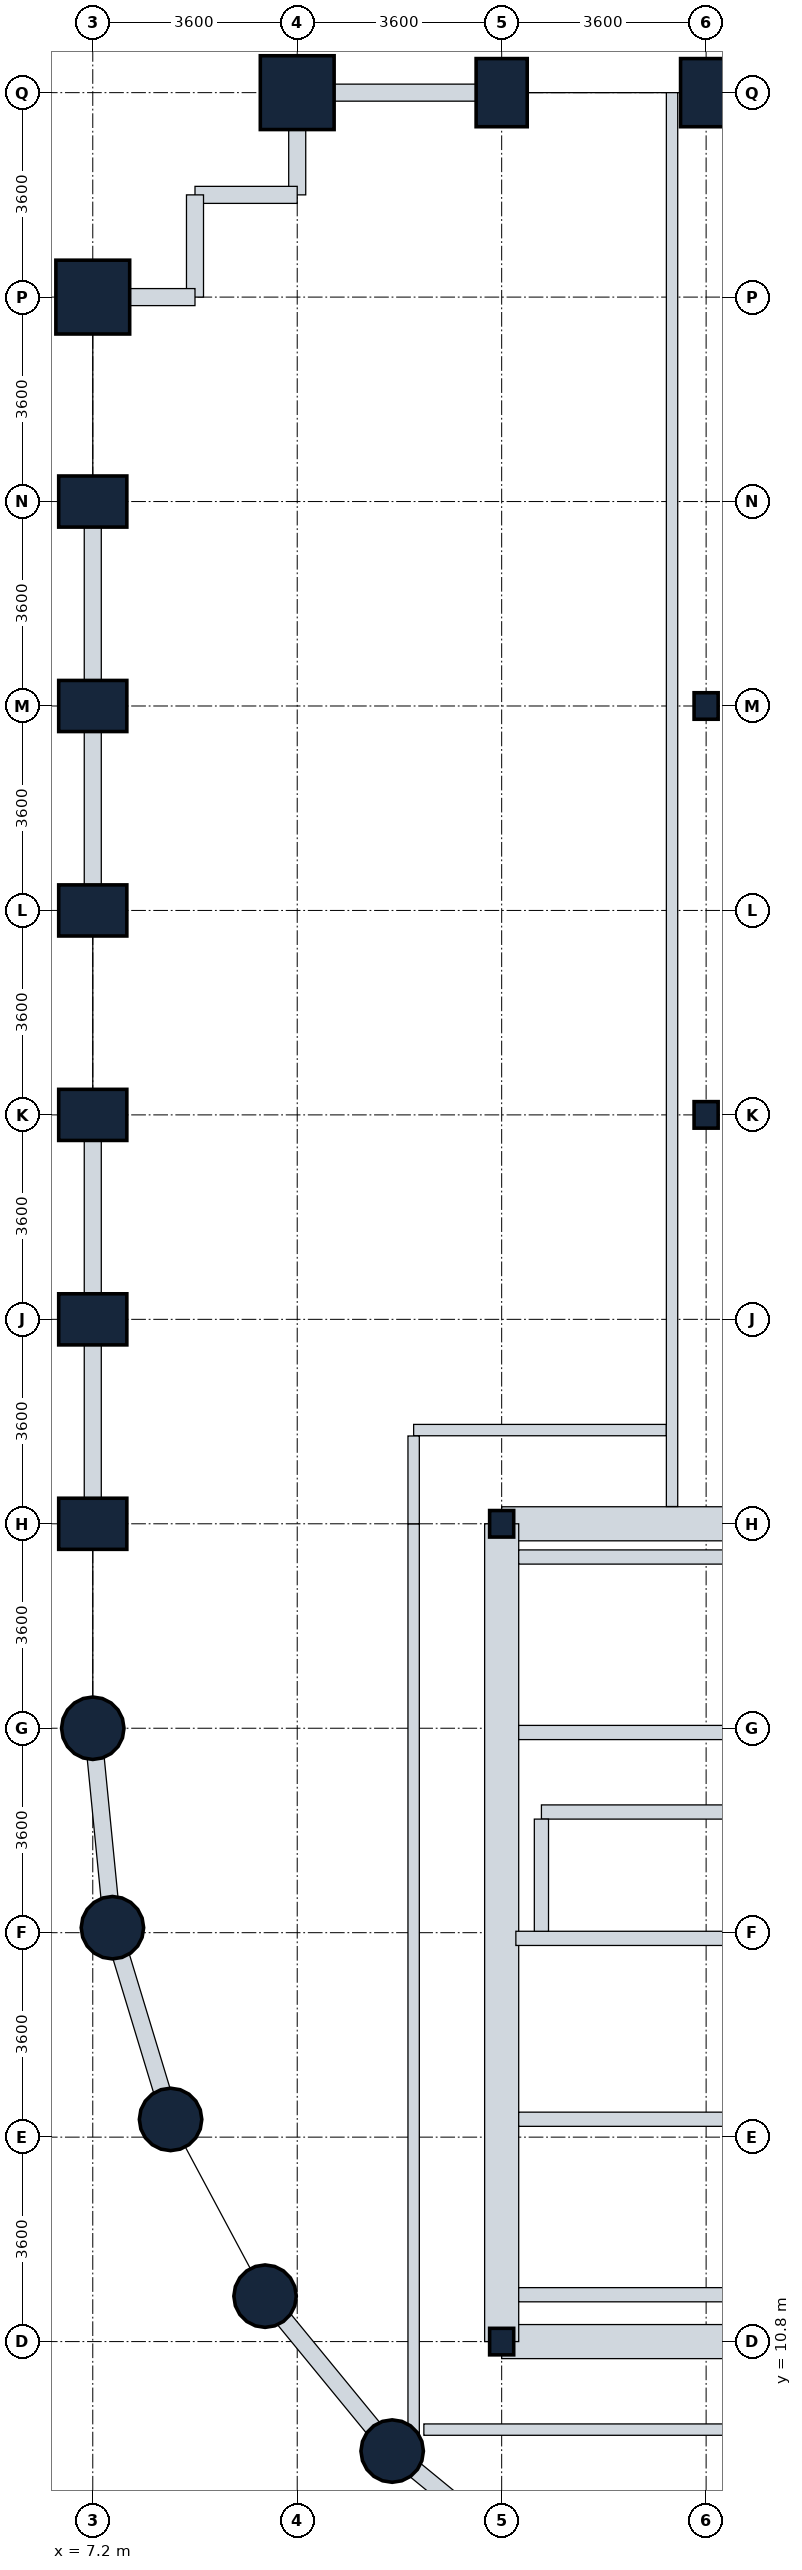
"""IFC4 building model, lengths in metres.
Left out: names, types, materials, properties, quantities, classifications, styles, units other than length and angle.
Written with IfcOpenShell. Run it as: python <this file> out.ifc"""

import sys

from ifc_helpers import new_model, si_unit, direction, frame, frame_2d, origin, origin_2d, place, context, subcontext, project, spatial, rectangle, circle, i_section, extrude, element, fill, save


model = new_model("IFC4")
c1 = context("Model", 3, precision=1e-05, world=origin(), true_north=direction((0.0, 1.0)))
c2 = subcontext(c1, "Body", "Model", "MODEL_VIEW")
j1 = project(units=[si_unit("LENGTHUNIT", "METRE"), si_unit("PLANEANGLEUNIT", "RADIAN")], contexts=[c1])
p1 = place(None, origin())
s1 = spatial("IfcSite", under=j1, at=p1, CompositionType="ELEMENT")
p2 = place(p1, origin())
s2 = spatial("IfcBuilding", under=s1, at=p2, CompositionType="ELEMENT")
p3 = place(p2, frame((0.0, 0.0, 74.7)))
s3 = spatial("IfcBuildingStorey", under=s2, at=p3, CompositionType="ELEMENT", Elevation=74.7)
p4 = place(p3, frame((7.2, 21.6, 0.0), z_axis=(0.0, 0.0, 1.0), x_axis=(1.0, 0.0, 0.0)))
e1 = element("IfcColumn", 1, at=p4, inside=s3, PredefinedType="COLUMN", context=c2, shape_type="SweptSolid", body=[
    extrude(circle(Radius=0.55, at=origin_2d()), origin(), (0.0, 0.0, 1.0), 5.4),
])
for number, where, z_axis, x_axis in (
    (2, (7.2, 25.2, 0.0), (0.0, 0.0, 1.0), (0.0, 1.0, 0.0)),
    (3, (7.2, 28.8, 0.0), (0.0, 0.0, 1.0), (0.0, 1.0, 0.0)),
    (4, (7.2, 32.4, 0.0), (0.0, 0.0, 1.0), (0.0, 1.0, 0.0)),
    (5, (7.2, 36.0, 0.0), (0.0, 0.0, 1.0), (0.0, 1.0, 0.0)),
    (6, (7.2, 39.6, 0.0), (0.0, 0.0, 1.0), (0.0, 1.0, 0.0)),
    (7, (7.2, 43.2, 0.0), (0.0, 0.0, 1.0), (0.0, 1.0, 0.0)),
):
    element("IfcColumn", number, at=place(p3, frame(where, z_axis=z_axis, x_axis=x_axis)), inside=s3, PredefinedType="COLUMN", context=c2, shape_type="SweptSolid", body=[
        extrude(rectangle(XDim=0.9, YDim=1.2, at=origin_2d()), origin(), (0.0, 0.0, 1.0), 5.4),
    ])
p5 = place(p3, frame((7.2, 46.8, 0.0), z_axis=(0.0, 0.0, 1.0), x_axis=(0.0, 1.0, 0.0)))
e8 = element("IfcColumn", 8, at=p5, inside=s3, PredefinedType="COLUMN", context=c2, shape_type="SweptSolid", body=[
    extrude(rectangle(XDim=1.3, YDim=1.3, at=origin_2d()), origin(), (0.0, 0.0, 1.0), 5.4),
])
for number, where, z_axis, x_axis in (
    (9, (7.546, 18.088, 0.0), (0.0, 0.0, 1.0), (1.0, 0.0, 0.0)),
    (10, (8.57, 14.712, 0.0), (0.0, 0.0, 1.0), (1.0, 0.0, 0.0)),
    (11, (10.234, 11.6, 0.0), (0.0, 0.0, 1.0), (1.0, 0.0, 0.0)),
):
    element("IfcColumn", number, at=place(p3, frame(where, z_axis=z_axis, x_axis=x_axis)), inside=s3, PredefinedType="COLUMN", context=c2, shape_type="SweptSolid", body=[
        extrude(circle(Radius=0.55, at=origin_2d()), origin(), (0.0, 0.0, 1.0), 5.4),
    ])
p6 = place(p3, frame((10.8, 50.4, 0.0), z_axis=(0.0, 0.0, 1.0), x_axis=(1.0, 0.0, 0.0)))
e12 = element("IfcColumn", 12, at=p6, inside=s3, PredefinedType="COLUMN", context=c2, shape_type="SweptSolid", body=[
    extrude(rectangle(XDim=1.3, YDim=1.3, at=origin_2d()), origin(), (0.0, 0.0, 1.0), 5.4),
])
p7 = place(p3, frame((12.472, 8.872, 0.0), z_axis=(0.0, 0.0, 1.0), x_axis=(1.0, 0.0, 0.0)))
e13 = element("IfcColumn", 13, at=p7, inside=s3, PredefinedType="COLUMN", context=c2, shape_type="SweptSolid", body=[
    extrude(circle(Radius=0.55, at=origin_2d()), origin(), (0.0, 0.0, 1.0), 5.4),
])
for number, where, z_axis, x_axis in (
    (14, (14.4, 10.8, 0.0), (0.0, 0.0, 1.0), (1.0, 0.0, 0.0)),
    (15, (14.4, 25.2, 0.0), (0.0, 0.0, 1.0), (1.0, 0.0, 0.0)),
):
    element("IfcColumn", number, at=place(p3, frame(where, z_axis=z_axis, x_axis=x_axis)), inside=s3, PredefinedType="COLUMN", context=c2, shape_type="SweptSolid", body=[
        extrude(i_section(OverallWidth=0.424, OverallDepth=0.467, WebThickness=0.033, FlangeThickness=0.053, FilletRadius=0.015, at=origin_2d()), origin(), (0.0, 0.0, 1.0), 5.4),
    ])
p8 = place(p3, frame((14.4, 50.4, 0.0), z_axis=(0.0, 0.0, 1.0), x_axis=(1.0, 0.0, 0.0)))
e16 = element("IfcColumn", 16, at=p8, inside=s3, PredefinedType="COLUMN", context=c2, shape_type="SweptSolid", body=[
    extrude(rectangle(XDim=0.9, YDim=1.2, at=origin_2d()), origin(), (0.0, 0.0, 1.0), 5.4),
])
for number, where, z_axis, x_axis in (
    (17, (18.0, 32.4, 0.0), (0.0, 0.0, 1.0), (1.0, 0.0, 0.0)),
    (18, (18.0, 39.6, 0.0), (0.0, 0.0, 1.0), (1.0, 0.0, 0.0)),
):
    element("IfcColumn", number, at=place(p3, frame(where, z_axis=z_axis, x_axis=x_axis)), inside=s3, PredefinedType="COLUMN", context=c2, shape_type="SweptSolid", body=[
        extrude(i_section(OverallWidth=0.424, OverallDepth=0.467, WebThickness=0.033, FlangeThickness=0.053, FilletRadius=0.015, at=origin_2d()), origin(), (0.0, 0.0, 1.0), 5.4),
    ])
p9 = place(p3, frame((18.0, 50.4, 0.0), z_axis=(0.0, 0.0, 1.0), x_axis=(1.0, 0.0, 0.0)))
e19 = element("IfcColumn", 19, at=p9, inside=s3, PredefinedType="COLUMN", context=c2, shape_type="SweptSolid", body=[
    extrude(rectangle(XDim=0.9, YDim=1.2, at=origin_2d()), origin(), (0.0, 0.0, 1.0), 5.4),
])
p10 = place(p3, frame((18.0, 50.4, 0.0), z_axis=(0.0, 0.0, 1.0), x_axis=(1.0, 0.0, 0.0)))
e20 = element("IfcWall", 20, at=p10, inside=s3, PredefinedType="STANDARD", context=c2, shape_type="SweptSolid", body=[
    extrude(rectangle(XDim=3.6, YDim=0.3, at=frame_2d((1.8, 0.0))), origin(), (0.0, 0.0, 1.0), 3.58),
])
p11 = place(p3, frame((10.8, 50.4, 0.0), z_axis=(0.0, 0.0, 1.0), x_axis=(1.0, 0.0, 0.0)))
e21 = element("IfcWall", 21, at=p11, inside=s3, PredefinedType="STANDARD", context=c2, shape_type="SweptSolid", body=[
    extrude(rectangle(XDim=3.6, YDim=0.3, at=frame_2d((1.8, 0.0))), origin(), (0.0, 0.0, 1.0), 4.03),
])
p12 = place(p3, frame((10.8, 48.6, 0.0), z_axis=(0.0, 0.0, 1.0), x_axis=(0.0, 1.0, 0.0)))
e22 = element("IfcWall", 22, at=p12, inside=s3, PredefinedType="STANDARD", context=c2, shape_type="SweptSolid", body=[
    extrude(rectangle(XDim=1.8, YDim=0.3, at=frame_2d((0.9, 0.0))), origin(), (0.0, 0.0, 1.0), 4.03),
])
p13 = place(p3, frame((9.0, 48.6, 0.0), z_axis=(0.0, 0.0, 1.0), x_axis=(1.0, 0.0, 0.0)))
e23 = element("IfcWall", 23, at=p13, inside=s3, PredefinedType="STANDARD", context=c2, shape_type="SweptSolid", body=[
    extrude(rectangle(XDim=1.8, YDim=0.3, at=frame_2d((0.9, 0.0))), origin(), (0.0, 0.0, 1.0), 5.065),
])
for number, where, z_axis, x_axis in (
    (24, (9.0, 46.8, 0.0), (0.0, 0.0, 1.0), (0.0, 1.0, 0.0)),
    (25, (7.2, 46.8, 0.0), (0.0, 0.0, 1.0), (1.0, 0.0, 0.0)),
):
    element("IfcWall", number, at=place(p3, frame(where, z_axis=z_axis, x_axis=x_axis)), inside=s3, PredefinedType="STANDARD", context=c2, shape_type="SweptSolid", body=[
        extrude(rectangle(XDim=1.8, YDim=0.3, at=frame_2d((0.9, 0.0))), origin(), (0.0, 0.0, 1.0), 3.58),
    ])
p14 = place(p3, frame((7.2, 39.6, 0.0), z_axis=(0.0, 0.0, 1.0), x_axis=(0.0, 1.0, 0.0)))
e26 = element("IfcWall", 26, at=p14, inside=s3, PredefinedType="STANDARD", context=c2, shape_type="SweptSolid", body=[
    extrude(rectangle(XDim=3.6, YDim=0.3, at=frame_2d((1.8, 0.0))), origin(), (0.0, 0.0, 1.0), 4.43),
])
p15 = place(p3, frame((7.2, 36.0, 0.0), z_axis=(0.0, 0.0, 1.0), x_axis=(0.0, 1.0, 0.0)))
e27 = element("IfcWall", 27, at=p15, inside=s3, PredefinedType="STANDARD", context=c2, shape_type="SweptSolid", body=[
    extrude(rectangle(XDim=3.6, YDim=0.3, at=frame_2d((1.8, 0.0))), origin(), (0.0, 0.0, 1.0), 4.43),
])
p16 = place(p3, frame((7.2, 28.8, 0.0), z_axis=(0.0, 0.0, 1.0), x_axis=(0.0, 1.0, 0.0)))
e28 = element("IfcWall", 28, at=p16, inside=s3, PredefinedType="STANDARD", context=c2, shape_type="SweptSolid", body=[
    extrude(rectangle(XDim=3.6, YDim=0.3, at=frame_2d((1.8, 0.0))), origin(), (0.0, 0.0, 1.0), 4.43),
])
p17 = place(p3, frame((7.2, 25.2, 0.0), z_axis=(0.0, 0.0, 1.0), x_axis=(0.0, 1.0, 0.0)))
e29 = element("IfcWall", 29, at=p17, inside=s3, PredefinedType="STANDARD", context=c2, shape_type="SweptSolid", body=[
    extrude(rectangle(XDim=3.6, YDim=0.3, at=frame_2d((1.8, 0.0))), origin(), (0.0, 0.0, 1.0), 4.43),
])
p18 = place(p3, frame((7.546, 18.088, 0.0), z_axis=(0.0, 0.0, 1.0), x_axis=(-0.09802417461, 0.995184033831, 0.0)))
e30 = element("IfcWall", 30, at=p18, inside=s3, PredefinedType="STANDARD", context=c2, shape_type="SweptSolid", body=[
    extrude(rectangle(XDim=3.529, YDim=0.3, at=frame_2d((1.765, 0.0))), origin(), (0.0, 0.0, 1.0), 4.43),
])
p19 = place(p3, frame((8.57, 14.712, 0.0), z_axis=(0.0, 0.0, 1.0), x_axis=(-0.290305086481, 0.956934144423, 0.0)))
e31 = element("IfcWall", 31, at=p19, inside=s3, PredefinedType="STANDARD", context=c2, shape_type="SweptSolid", body=[
    extrude(rectangle(XDim=3.528, YDim=0.3, at=frame_2d((1.764, 0.0))), origin(), (0.0, 0.0, 1.0), 4.43),
])
for number, where, z_axis, x_axis in (
    (32, (12.472, 8.872, 0.0), (0.0, 0.0, 1.0), (-0.634, 0.773, 0.0)),
    (33, (15.2, 6.634, 0.0), (0.0, 0.0, 1.0), (-0.773, 0.634, 0.0)),
):
    element("IfcWall", number, at=place(p3, frame(where, z_axis=z_axis, x_axis=x_axis)), inside=s3, PredefinedType="STANDARD", context=c2, shape_type="SweptSolid", body=[
        extrude(rectangle(XDim=3.529, YDim=0.3, at=frame_2d((1.764, 0.0))), origin(), (0.0, 0.0, 1.0), 4.43),
    ])
p20 = place(p3, frame((14.4, 10.8, 0.0), z_axis=(0.0, 0.0, 1.0), x_axis=(1.0, 0.0, 0.0)))
e34 = element("IfcWall", 34, at=p20, inside=s3, PredefinedType="SHEAR", context=c2, shape_type="SweptSolid", body=[
    extrude(rectangle(XDim=18.0, YDim=0.6, at=frame_2d((9.0, 0.0))), origin(), (0.0, 0.0, 1.0), 5.08),
])
p21 = place(p3, frame((14.4, 25.2, 0.0), z_axis=(0.0, 0.0, 1.0), x_axis=(1.0, 0.0, 0.0)))
e35 = element("IfcWall", 35, at=p21, inside=s3, PredefinedType="SHEAR", context=c2, shape_type="SweptSolid", body=[
    extrude(rectangle(XDim=14.4, YDim=0.6, at=frame_2d((7.2, 0.0))), origin(), (0.0, 0.0, 1.0), 5.08),
])
p22 = place(p3, frame((14.4, 10.8, 0.0), z_axis=(0.0, 0.0, 1.0), x_axis=(0.0, 1.0, 0.0)))
e36 = element("IfcWall", 36, at=p22, inside=s3, PredefinedType="SHEAR", context=c2, shape_type="SweptSolid", body=[
    extrude(rectangle(XDim=14.4, YDim=0.6, at=frame_2d((7.2, 0.0))), origin(), (0.0, 0.0, 1.0), 5.08),
])
p23 = place(p22, frame((11.05, 0.0, 0.0)))
e37 = element("IfcOpeningElement", 37, at=p23, cuts=e36, PredefinedType="OPENING", context=c2, shape_type="SweptSolid", body=[
    extrude(rectangle(XDim=1.1, YDim=2.1, at=frame_2d((0.55, 1.05))), frame((0.0, 0.31, 0.0), z_axis=(0.0, -1.0, 0.0), x_axis=(1.0, 0.0, 0.0)), (0.0, 0.0, 1.0), 0.62),
])
p24 = place(p22, frame((4.9, 0.0, 0.0)))
e38 = element("IfcOpeningElement", 38, at=p24, cuts=e36, PredefinedType="OPENING", context=c2, shape_type="SweptSolid", body=[
    extrude(rectangle(XDim=1.2, YDim=2.1, at=frame_2d((0.6, 1.05))), frame((0.0, 0.31, 0.0), z_axis=(0.0, -1.0, 0.0), x_axis=(1.0, 0.0, 0.0)), (0.0, 0.0, 1.0), 0.62),
])
p25 = place(p3, frame((14.7, 11.625, 0.0), z_axis=(0.0, 0.0, 1.0), x_axis=(1.0, 0.0, 0.0)))
e39 = element("IfcWall", 39, at=p25, inside=s3, PredefinedType="SHEAR", context=c2, shape_type="SweptSolid", body=[
    extrude(rectangle(XDim=8.65, YDim=0.25, at=frame_2d((4.325, 0.0))), origin(), (0.0, 0.0, 1.0), 5.08),
])
p26 = place(p3, frame((14.7, 14.715, 0.0), z_axis=(0.0, 0.0, 1.0), x_axis=(1.0, 0.0, 0.0)))
e40 = element("IfcWall", 40, at=p26, inside=s3, PredefinedType="SHEAR", context=c2, shape_type="SweptSolid", body=[
    extrude(rectangle(XDim=8.65, YDim=0.25, at=frame_2d((4.325, 0.0))), origin(), (0.0, 0.0, 1.0), 5.08),
])
p27 = place(p26, frame((0.655, 0.0, 0.0)))
e41 = element("IfcOpeningElement", 41, at=p27, cuts=e40, PredefinedType="OPENING", context=c2, shape_type="SweptSolid", body=[
    extrude(rectangle(XDim=1.1, YDim=2.1, at=frame_2d((0.55, 1.05))), frame((0.0, 0.135, 0.0), z_axis=(0.0, -1.0, 0.0), x_axis=(1.0, 0.0, 0.0)), (0.0, 0.0, 1.0), 0.27),
])
for number, where, z_axis, x_axis in (
    (42, (14.7, 21.525, 0.0), (0.0, 0.0, 1.0), (1.0, 0.0, 0.0)),
    (43, (14.7, 24.615, 0.0), (0.0, 0.0, 1.0), (1.0, 0.0, 0.0)),
):
    element("IfcWall", number, at=place(p3, frame(where, z_axis=z_axis, x_axis=x_axis)), inside=s3, PredefinedType="SHEAR", context=c2, shape_type="SweptSolid", body=[
        extrude(rectangle(XDim=8.2, YDim=0.25, at=frame_2d((4.1, 0.0))), origin(), (0.0, 0.0, 1.0), 5.08),
    ])
p28 = place(p3, frame((14.65, 17.9, 0.0), z_axis=(0.0, 0.0, 1.0), x_axis=(1.0, 0.0, 0.0)))
e44 = element("IfcWall", 44, at=p28, inside=s3, PredefinedType="PARTITIONING", context=c2, shape_type="SweptSolid", body=[
    extrude(rectangle(XDim=7.15, YDim=0.25, at=frame_2d((3.575, 0.0))), origin(), (0.0, 0.0, 1.0), 5.065),
])
p29 = place(p3, frame((15.1, 20.125, 0.0), z_axis=(0.0, 0.0, 1.0), x_axis=(1.0, 0.0, 0.0)))
e45 = element("IfcWall", 45, at=p29, inside=s3, PredefinedType="PARTITIONING", context=c2, shape_type="SweptSolid", body=[
    extrude(rectangle(XDim=7.55, YDim=0.25, at=frame_2d((3.775, 0.0))), origin(), (0.0, 0.0, 1.0), 5.065),
])
p30 = place(p29, frame((0.45, 0.0, 0.0)))
e46 = element("IfcOpeningElement", 46, at=p30, cuts=e45, PredefinedType="OPENING", context=c2, shape_type="SweptSolid", body=[
    extrude(rectangle(XDim=1.1, YDim=2.1, at=frame_2d((0.55, 1.05))), frame((0.0, 0.135, 0.0), z_axis=(0.0, -1.0, 0.0), x_axis=(1.0, 0.0, 0.0)), (0.0, 0.0, 1.0), 0.27),
])
p31 = place(p29, frame((2.3, 0.0, 0.0)))
e47 = element("IfcOpeningElement", 47, at=p31, cuts=e45, PredefinedType="OPENING", context=c2, shape_type="SweptSolid", body=[
    extrude(rectangle(XDim=1.1, YDim=2.1, at=frame_2d((0.55, 1.05))), frame((0.0, 0.135, 0.0), z_axis=(0.0, -1.0, 0.0), x_axis=(1.0, 0.0, 0.0)), (0.0, 0.0, 1.0), 0.27),
])
p32 = place(p29, frame((4.15, 0.0, 0.0)))
e48 = element("IfcOpeningElement", 48, at=p32, cuts=e45, PredefinedType="OPENING", context=c2, shape_type="SweptSolid", body=[
    extrude(rectangle(XDim=1.1, YDim=2.1, at=frame_2d((0.55, 1.05))), frame((0.0, 0.135, 0.0), z_axis=(0.0, -1.0, 0.0), x_axis=(1.0, 0.0, 0.0)), (0.0, 0.0, 1.0), 0.27),
])
p33 = place(p29, frame((6.0, 0.0, 0.0)))
e49 = element("IfcOpeningElement", 49, at=p33, cuts=e45, PredefinedType="OPENING", context=c2, shape_type="SweptSolid", body=[
    extrude(rectangle(XDim=1.1, YDim=2.1, at=frame_2d((0.55, 1.05))), frame((0.0, 0.135, 0.0), z_axis=(0.0, -1.0, 0.0), x_axis=(1.0, 0.0, 0.0)), (0.0, 0.0, 1.0), 0.27),
])
p34 = place(p3, frame((15.1, 18.025, 0.0), z_axis=(0.0, 0.0, 1.0), x_axis=(0.0, 1.0, 0.0)))
e50 = element("IfcWall", 50, at=p34, inside=s3, PredefinedType="PARTITIONING", context=c2, shape_type="SweptSolid", body=[
    extrude(rectangle(XDim=1.975, YDim=0.25, at=frame_2d((0.988, 0.0))), origin(), (0.0, 0.0, 1.0), 5.065),
])
p35 = place(p3, frame((17.4, 25.504, 0.0), z_axis=(0.0, 0.0, 1.0), x_axis=(0.0, 1.0, 0.0)))
e51 = element("IfcWall", 51, at=p35, inside=s3, PredefinedType="PARTITIONING", context=c2, shape_type="SweptSolid", body=[
    extrude(rectangle(XDim=24.896, YDim=0.2, at=frame_2d((12.448, 0.0))), origin(), (0.0, 0.0, 1.0), 3.58),
])
p36 = place(p3, frame((12.85, 8.716, 0.0), z_axis=(0.0, 0.0, 1.0), x_axis=(0.0, 1.0, 0.0)))
e52 = element("IfcWall", 52, at=p36, inside=s3, PredefinedType="PARTITIONING", context=c2, shape_type="SweptSolid", body=[
    extrude(rectangle(XDim=16.484, YDim=0.2, at=frame_2d((8.242, 0.0))), origin(), (0.0, 0.0, 1.0), 4.43),
])
p37 = place(p36, frame((7.565, 0.0, 0.0)))
e53 = element("IfcOpeningElement", 53, at=p37, cuts=e52, PredefinedType="OPENING", context=c2, shape_type="SweptSolid", body=[
    extrude(rectangle(XDim=1.2, YDim=2.1, at=frame_2d((0.6, 1.05))), frame((0.0, 0.11, 0.0), z_axis=(0.0, -1.0, 0.0), x_axis=(1.0, 0.0, 0.0)), (0.0, 0.0, 1.0), 0.22),
])
p38 = place(p3, frame((12.85, 26.85, 0.0), z_axis=(0.0, 0.0, 1.0), x_axis=(1.0, 0.0, 0.0)))
e54 = element("IfcWall", 54, at=p38, inside=s3, PredefinedType="PARTITIONING", context=c2, shape_type="SweptSolid", body=[
    extrude(rectangle(XDim=4.446, YDim=0.2, at=frame_2d((2.223, 0.0))), origin(), (0.0, 0.0, 1.0), 5.065),
])
p39 = place(p38, frame((2.97, 0.0, 0.0)))
e55 = element("IfcOpeningElement", 55, at=p39, cuts=e54, PredefinedType="OPENING", context=c2, shape_type="SweptSolid", body=[
    extrude(rectangle(XDim=1.2, YDim=2.1, at=frame_2d((0.6, 1.05))), frame((0.0, 0.11, 0.0), z_axis=(0.0, -1.0, 0.0), x_axis=(1.0, 0.0, 0.0)), (0.0, 0.0, 1.0), 0.22),
])
p40 = place(p3, frame((12.85, 25.2, 0.0), z_axis=(0.0, 0.0, 1.0), x_axis=(0.0, 1.0, 0.0)))
e56 = element("IfcWall", 56, at=p40, inside=s3, PredefinedType="PARTITIONING", context=c2, shape_type="SweptSolid", body=[
    extrude(rectangle(XDim=1.546, YDim=0.2, at=frame_2d((0.773, 0.0))), origin(), (0.0, 0.0, 1.0), 5.065),
])
p41 = place(p3, frame((13.03, 9.25, 0.0), z_axis=(0.0, 0.0, 1.0), x_axis=(1.0, 0.0, 0.0)))
e57 = element("IfcWall", 57, at=p41, inside=s3, PredefinedType="PARTITIONING", context=c2, shape_type="SweptSolid", body=[
    extrude(rectangle(XDim=21.37, YDim=0.2, at=frame_2d((10.685, 0.0))), origin(), (0.0, 0.0, 1.0), 4.61),
])
p42 = place(p41, frame((11.248, 0.0, 0.0)))
e58 = element("IfcOpeningElement", 58, at=p42, cuts=e57, PredefinedType="OPENING", context=c2, shape_type="SweptSolid", body=[
    extrude(rectangle(XDim=1.2, YDim=2.1, at=frame_2d((0.6, 1.05))), frame((0.0, 0.11, 0.0), z_axis=(0.0, -1.0, 0.0), x_axis=(1.0, 0.0, 0.0)), (0.0, 0.0, 1.0), 0.22),
])
p43 = place(p27, origin())
e59 = element("IfcDoor", 59, at=p43, inside=s3, OperationType="SINGLE_SWING_LEFT", PredefinedType="DOOR", context=c2, shape_type="SweptSolid", body=[
    extrude(rectangle(XDim=1.1, YDim=2.1, at=frame_2d((0.55, 1.05))), frame((0.0, 0.025, 0.0), z_axis=(0.0, -1.0, 0.0), x_axis=(1.0, 0.0, 0.0)), (0.0, 0.0, 1.0), 0.05),
])
fill(e41, e59)
p44 = place(p23, origin())
e60 = element("IfcDoor", 60, at=p44, inside=s3, OperationType="SINGLE_SWING_RIGHT", PredefinedType="DOOR", context=c2, shape_type="SweptSolid", body=[
    extrude(rectangle(XDim=1.1, YDim=2.1, at=frame_2d((0.55, 1.05))), frame((0.0, 0.025, 0.0), z_axis=(0.0, -1.0, 0.0), x_axis=(1.0, 0.0, 0.0)), (0.0, 0.0, 1.0), 0.05),
])
fill(e37, e60)
p45 = place(p24, origin())
e61 = element("IfcDoor", 61, at=p45, inside=s3, OperationType="SINGLE_SWING_RIGHT", PredefinedType="DOOR", context=c2, shape_type="SweptSolid", body=[
    extrude(rectangle(XDim=1.2, YDim=2.1, at=frame_2d((0.6, 1.05))), frame((0.0, 0.025, 0.0), z_axis=(0.0, -1.0, 0.0), x_axis=(1.0, 0.0, 0.0)), (0.0, 0.0, 1.0), 0.05),
])
fill(e38, e61)
p46 = place(p30, origin())
e62 = element("IfcDoor", 62, at=p46, inside=s3, OperationType="SLIDING_TO_LEFT", PredefinedType="DOOR", context=c2, shape_type="SweptSolid", body=[
    extrude(rectangle(XDim=1.1, YDim=2.1, at=frame_2d((0.55, 1.05))), frame((0.0, 0.025, 0.0), z_axis=(0.0, -1.0, 0.0), x_axis=(1.0, 0.0, 0.0)), (0.0, 0.0, 1.0), 0.05),
])
fill(e46, e62)
p47 = place(p31, origin())
e63 = element("IfcDoor", 63, at=p47, inside=s3, OperationType="SLIDING_TO_LEFT", PredefinedType="DOOR", context=c2, shape_type="SweptSolid", body=[
    extrude(rectangle(XDim=1.1, YDim=2.1, at=frame_2d((0.55, 1.05))), frame((0.0, 0.025, 0.0), z_axis=(0.0, -1.0, 0.0), x_axis=(1.0, 0.0, 0.0)), (0.0, 0.0, 1.0), 0.05),
])
fill(e47, e63)
p48 = place(p37, origin())
e64 = element("IfcDoor", 64, at=p48, inside=s3, OperationType="SINGLE_SWING_LEFT", PredefinedType="DOOR", context=c2, shape_type="SweptSolid", body=[
    extrude(rectangle(XDim=1.2, YDim=2.1, at=frame_2d((0.6, 1.05))), frame((0.0, 0.025, 0.0), z_axis=(0.0, -1.0, 0.0), x_axis=(1.0, 0.0, 0.0)), (0.0, 0.0, 1.0), 0.05),
])
fill(e53, e64)
p49 = place(p39, origin())
e65 = element("IfcDoor", 65, at=p49, inside=s3, OperationType="SINGLE_SWING_RIGHT", PredefinedType="DOOR", context=c2, shape_type="SweptSolid", body=[
    extrude(rectangle(XDim=1.2, YDim=2.1, at=frame_2d((0.6, 1.05))), frame((0.0, 0.025, 0.0), z_axis=(0.0, -1.0, 0.0), x_axis=(1.0, 0.0, 0.0)), (0.0, 0.0, 1.0), 0.05),
])
fill(e55, e65)
save(model, sys.argv[1])
